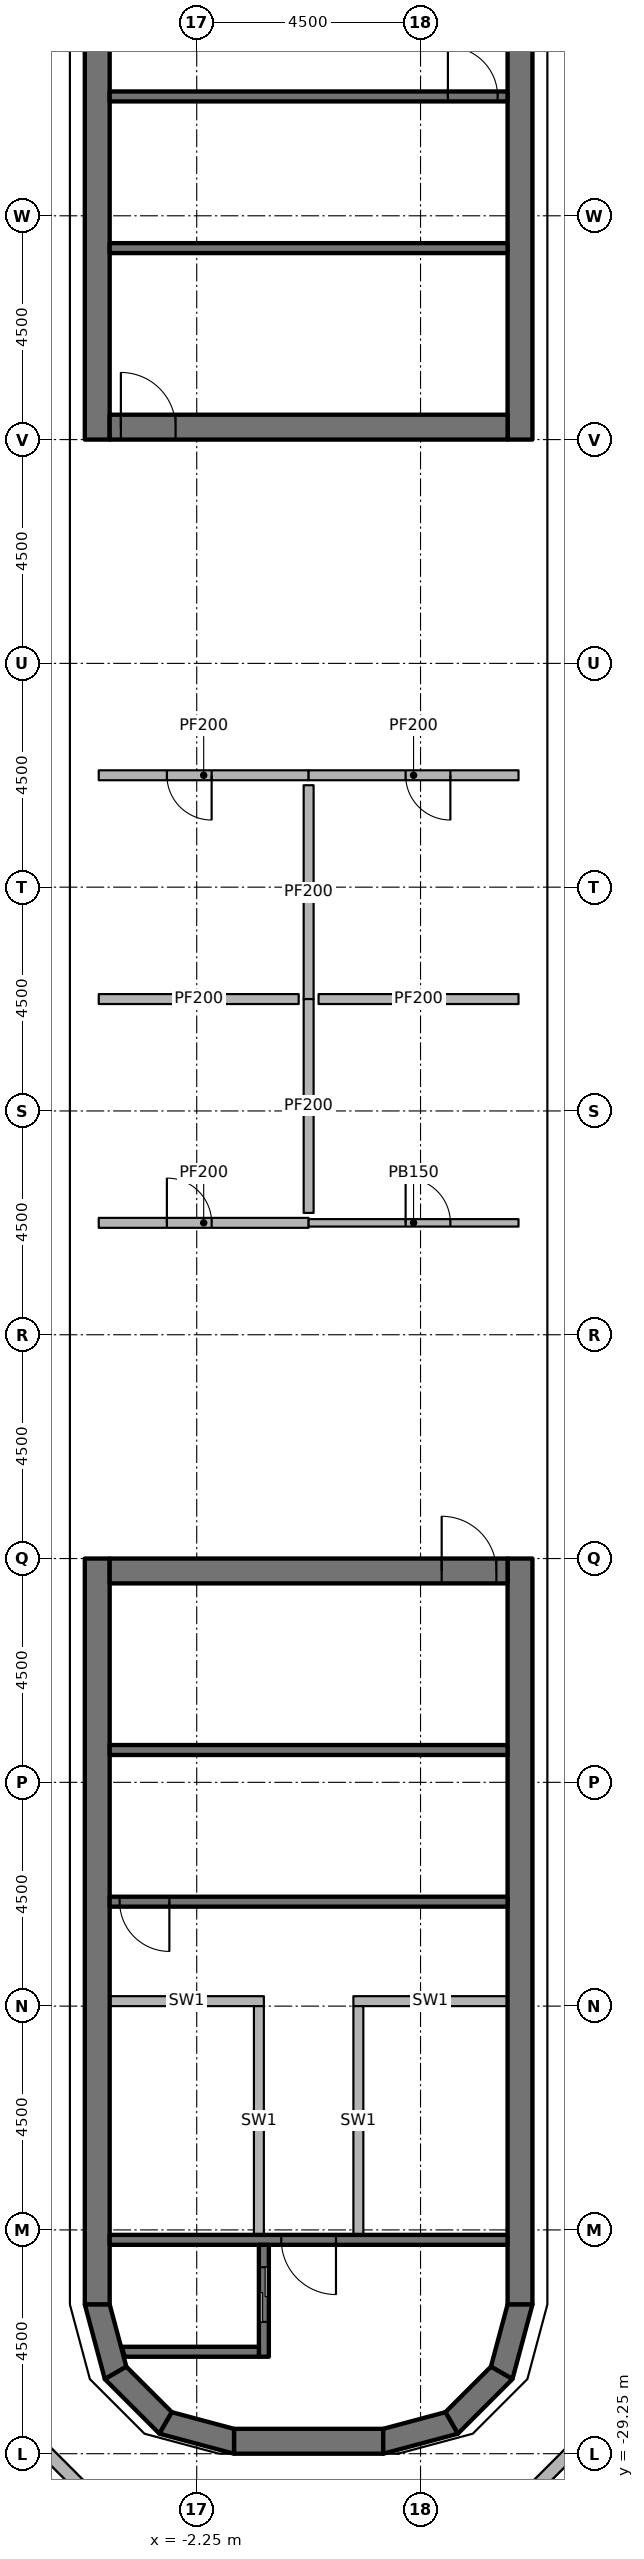
"""IFC4 building model, lengths in metres.
Left out: names, types, materials, properties, quantities, classifications, styles, units other than length and angle.
Written with IfcOpenShell. Run it as: python <this file> out.ifc"""

import sys

from ifc_helpers import new_model, si_unit, direction, frame, frame_2d, origin, origin_2d, place, context, subcontext, project, spatial, polyline, rectangle, outline, extrude, element, fill, save


model = new_model("IFC4")
c1 = context("Model", 3, precision=1e-05, world=origin(), true_north=direction((0.0, 1.0)))
c2 = subcontext(c1, "Body", "Model", "MODEL_VIEW")
j1 = project(units=[si_unit("LENGTHUNIT", "METRE"), si_unit("PLANEANGLEUNIT", "RADIAN")], contexts=[c1])
p1 = place(None, origin())
s1 = spatial("IfcSite", under=j1, at=p1, CompositionType="ELEMENT")
p2 = place(p1, origin())
s2 = spatial("IfcBuilding", under=s1, at=p2, CompositionType="ELEMENT")
p3 = place(p2, frame((0.0, 0.0, 316.8)))
s3 = spatial("IfcBuildingStorey", under=s2, at=p3, CompositionType="ELEMENT", Elevation=316.8)
for number, where, z_axis, x_axis in (
    (1, (-4.25, 11.25, 0.0), (0.0, 0.0, 1.0), (0.0, 1.0, 0.0)),
    (2, (4.25, 11.25, 0.0), (0.0, 0.0, 1.0), (0.0, 1.0, 0.0)),
):
    element("IfcWall", number, at=place(p3, frame(where, z_axis=z_axis, x_axis=x_axis)), inside=s3, PredefinedType="SHEAR", context=c2, shape_type="SweptSolid", body=[
        extrude(rectangle(XDim=15.0, YDim=0.5, at=frame_2d((7.5, 0.0))), origin(), (0.0, 0.0, 1.0), 3.35),
    ])
p4 = place(p3, frame((-4.0, 11.5, 0.0), z_axis=(0.0, 0.0, 1.0), x_axis=(1.0, 0.0, 0.0)))
e3 = element("IfcWall", 3, at=p4, inside=s3, PredefinedType="SHEAR", context=c2, shape_type="SweptSolid", body=[
    extrude(rectangle(XDim=8.0, YDim=0.5, at=frame_2d((4.0, 0.0))), origin(), (0.0, 0.0, 1.0), 3.35),
])
p5 = place(p4, frame((0.225, 0.0, 0.0)))
e4 = element("IfcOpeningElement", 4, at=p5, cuts=e3, PredefinedType="OPENING", context=c2, shape_type="SweptSolid", body=[
    extrude(rectangle(XDim=1.1, YDim=2.1, at=frame_2d((0.55, 1.05))), frame((0.0, 0.26, 0.0), z_axis=(0.0, -1.0, 0.0), x_axis=(1.0, 0.0, 0.0)), (0.0, 0.0, 1.0), 0.52),
])
for number, where, z_axis, x_axis in (
    (5, (-4.25, -11.25, 0.0), (0.0, 0.0, 1.0), (0.0, -1.0, 0.0)),
    (6, (4.25, -11.25, 0.0), (0.0, 0.0, 1.0), (0.0, -1.0, 0.0)),
):
    element("IfcWall", number, at=place(p3, frame(where, z_axis=z_axis, x_axis=x_axis)), inside=s3, PredefinedType="SHEAR", context=c2, shape_type="SweptSolid", body=[
        extrude(rectangle(XDim=15.0, YDim=0.5, at=frame_2d((7.5, 0.0))), origin(), (0.0, 0.0, 1.0), 3.35),
    ])
p6 = place(p3, frame((-4.0, -11.5, 0.0), z_axis=(0.0, 0.0, 1.0), x_axis=(1.0, 0.0, 0.0)))
e7 = element("IfcWall", 7, at=p6, inside=s3, PredefinedType="SHEAR", context=c2, shape_type="SweptSolid", body=[
    extrude(rectangle(XDim=8.0, YDim=0.5, at=frame_2d((4.0, 0.0))), origin(), (0.0, 0.0, 1.0), 3.35),
])
p7 = place(p6, frame((6.675, 0.0, 0.0)))
e8 = element("IfcOpeningElement", 8, at=p7, cuts=e7, PredefinedType="OPENING", context=c2, shape_type="SweptSolid", body=[
    extrude(rectangle(XDim=1.1, YDim=2.1, at=frame_2d((0.55, 1.05))), frame((0.0, 0.26, 0.0), z_axis=(0.0, -1.0, 0.0), x_axis=(1.0, 0.0, 0.0)), (0.0, 0.0, 1.0), 0.52),
])
p8 = place(p3, frame((-1.5, -29.0, 0.0), z_axis=(0.0, 0.0, 1.0), x_axis=(1.0, 0.0, 0.0)))
e9 = element("IfcWall", 9, at=p8, inside=s3, PredefinedType="SHEAR", context=c2, shape_type="SweptSolid", body=[
    extrude(rectangle(XDim=3.0, YDim=0.5, at=frame_2d((1.5, 0.0))), origin(), (0.0, 0.0, 1.0), 3.35),
])
p9 = place(p3, origin())
e10 = element("IfcWall", 10, at=p9, inside=s3, PredefinedType="SHEAR", context=c2, shape_type="SweptSolid", body=[
    extrude(outline(polyline([(-4.5, -26.25), (-4.098, -27.75), (-3.665, -27.5), (-4.0, -26.25), (-4.5, -26.25)])), origin(), (0.0, 0.0, 1.0), 3.35),
])
p10 = place(p3, origin())
e11 = element("IfcWall", 11, at=p10, inside=s3, PredefinedType="SHEAR", context=c2, shape_type="SweptSolid", body=[
    extrude(outline(polyline([(-4.098, -27.75), (-3.0, -28.848), (-2.75, -28.415), (-3.665, -27.5), (-4.098, -27.75)])), origin(), (0.0, 0.0, 1.0), 3.35),
])
p11 = place(p3, origin())
e12 = element("IfcWall", 12, at=p11, inside=s3, PredefinedType="SHEAR", context=c2, shape_type="SweptSolid", body=[
    extrude(outline(polyline([(-3.0, -28.848), (-1.5, -29.25), (-1.5, -28.75), (-2.75, -28.415), (-3.0, -28.848)])), origin(), (0.0, 0.0, 1.0), 3.35),
])
p12 = place(p3, origin())
e13 = element("IfcWall", 13, at=p12, inside=s3, PredefinedType="SHEAR", context=c2, shape_type="SweptSolid", body=[
    extrude(outline(polyline([(4.5, -26.25), (4.098, -27.75), (3.665, -27.5), (4.0, -26.25), (4.5, -26.25)])), origin(), (0.0, 0.0, 1.0), 3.35),
])
p13 = place(p3, origin())
e14 = element("IfcWall", 14, at=p13, inside=s3, PredefinedType="SHEAR", context=c2, shape_type="SweptSolid", body=[
    extrude(outline(polyline([(4.098, -27.75), (3.0, -28.848), (2.75, -28.415), (3.665, -27.5), (4.098, -27.75)])), origin(), (0.0, 0.0, 1.0), 3.35),
])
p14 = place(p3, origin())
e15 = element("IfcWall", 15, at=p14, inside=s3, PredefinedType="SHEAR", context=c2, shape_type="SweptSolid", body=[
    extrude(outline(polyline([(3.0, -28.848), (1.5, -29.25), (1.5, -28.75), (2.75, -28.415), (3.0, -28.848)])), origin(), (0.0, 0.0, 1.0), 3.35),
])
p15 = place(p3, origin())
e16 = element("IfcWall", 16, at=p15, inside=s3, PredefinedType="PARAPET", context=c2, shape_type="SweptSolid", body=[
    extrude(outline(polyline([(-4.221, -30.444), (-5.994, -28.671), (-5.77, -28.542), (-4.092, -30.22), (-4.221, -30.444)])), origin(), (0.0, 0.0, 1.0), 1.22),
])
p16 = place(p3, origin())
e17 = element("IfcWall", 17, at=p16, inside=s3, PredefinedType="PARAPET", context=c2, shape_type="SweptSolid", body=[
    extrude(outline(polyline([(5.994, -28.671), (4.221, -30.444), (4.092, -30.22), (5.77, -28.542), (5.994, -28.671)])), origin(), (0.0, 0.0, 1.0), 1.22),
])
p17 = place(p3, frame((0.0, 0.0, 3.6)))
e18 = element("IfcWall", 18, at=p17, inside=s3, PredefinedType="PARAPET", context=c2, shape_type="SweptSolid", body=[
    extrude(outline(polyline([(-4.221, -30.444), (-5.994, -28.671), (-5.77, -28.542), (-4.092, -30.22), (-4.221, -30.444)])), origin(), (0.0, 0.0, 1.0), 1.22),
])
p18 = place(p3, frame((0.0, 0.0, 3.6)))
e19 = element("IfcWall", 19, at=p18, inside=s3, PredefinedType="PARAPET", context=c2, shape_type="SweptSolid", body=[
    extrude(outline(polyline([(5.994, -28.671), (4.221, -30.444), (4.092, -30.22), (5.77, -28.542), (5.994, -28.671)])), origin(), (0.0, 0.0, 1.0), 1.22),
])
p19 = place(p3, frame((-4.0, 18.15, 0.0), z_axis=(0.0, 0.0, 1.0), x_axis=(1.0, 0.0, 0.0)))
e20 = element("IfcWall", 20, at=p19, inside=s3, PredefinedType="SHEAR", context=c2, shape_type="SweptSolid", body=[
    extrude(rectangle(XDim=8.0, YDim=0.2, at=frame_2d((4.0, 0.0))), origin(), (0.0, 0.0, 1.0), 3.35),
])
p20 = place(p19, frame((6.8, 0.0, 0.0)))
e21 = element("IfcOpeningElement", 21, at=p20, cuts=e20, PredefinedType="OPENING", context=c2, shape_type="SweptSolid", body=[
    extrude(rectangle(XDim=1.0, YDim=2.1, at=frame_2d((0.5, 1.05))), frame((0.0, 0.11, 0.0), z_axis=(0.0, -1.0, 0.0), x_axis=(1.0, 0.0, 0.0)), (0.0, 0.0, 1.0), 0.22),
])
p21 = place(p3, frame((-4.0, 15.1, 0.0), z_axis=(0.0, 0.0, 1.0), x_axis=(1.0, 0.0, 0.0)))
e22 = element("IfcWall", 22, at=p21, inside=s3, PredefinedType="SHEAR", context=c2, shape_type="SweptSolid", body=[
    extrude(rectangle(XDim=8.0, YDim=0.2, at=frame_2d((4.0, 0.0))), origin(), (0.0, 0.0, 1.0), 3.35),
])
p22 = place(p3, frame((4.0, -24.95, 0.0), z_axis=(0.0, 0.0, 1.0), x_axis=(-1.0, 0.0, 0.0)))
e23 = element("IfcWall", 23, at=p22, inside=s3, PredefinedType="SHEAR", context=c2, shape_type="SweptSolid", body=[
    extrude(rectangle(XDim=8.0, YDim=0.2, at=frame_2d((4.0, 0.0))), origin(), (0.0, 0.0, 1.0), 3.35),
])
p23 = place(p22, frame((3.45, 0.0, 0.0)))
e24 = element("IfcOpeningElement", 24, at=p23, cuts=e23, PredefinedType="OPENING", context=c2, shape_type="SweptSolid", body=[
    extrude(rectangle(XDim=1.1, YDim=2.1, at=frame_2d((0.55, 1.05))), frame((0.0, 0.11, 0.0), z_axis=(0.0, -1.0, 0.0), x_axis=(1.0, 0.0, 0.0)), (0.0, 0.0, 1.0), 0.22),
])
p24 = place(p3, frame((-0.9, -27.3, 0.0), z_axis=(0.0, 0.0, 1.0), x_axis=(0.0, 1.0, 0.0)))
e25 = element("IfcWall", 25, at=p24, inside=s3, PredefinedType="SHEAR", context=c2, shape_type="SweptSolid", body=[
    extrude(rectangle(XDim=2.25, YDim=0.2, at=frame_2d((1.125, 0.0))), origin(), (0.0, 0.0, 1.0), 3.35),
])
p25 = place(p24, frame((0.7, 0.0, 0.0)))
e26 = element("IfcOpeningElement", 26, at=p25, cuts=e25, PredefinedType="OPENING", context=c2, shape_type="SweptSolid", body=[
    extrude(rectangle(XDim=1.1, YDim=2.3, at=frame_2d((0.55, 1.15))), frame((0.0, 0.11, 0.0), z_axis=(0.0, -1.0, 0.0), x_axis=(1.0, 0.0, 0.0)), (0.0, 0.0, 1.0), 0.22),
])
p26 = place(p3, origin())
e27 = element("IfcWall", 27, at=p26, inside=s3, PredefinedType="SHEAR", context=c2, shape_type="SweptSolid", body=[
    extrude(outline(polyline([(-1.0, -27.1), (-3.755, -27.1), (-3.701, -27.3), (-1.0, -27.3), (-1.0, -27.1)])), origin(), (0.0, 0.0, 1.0), 3.35),
])
p27 = place(p3, frame((4.0, -18.15, 0.0), z_axis=(0.0, 0.0, 1.0), x_axis=(-1.0, 0.0, 0.0)))
e28 = element("IfcWall", 28, at=p27, inside=s3, PredefinedType="SHEAR", context=c2, shape_type="SweptSolid", body=[
    extrude(rectangle(XDim=8.0, YDim=0.2, at=frame_2d((4.0, 0.0))), origin(), (0.0, 0.0, 1.0), 3.35),
])
p28 = place(p27, frame((6.8, 0.0, 0.0)))
e29 = element("IfcOpeningElement", 29, at=p28, cuts=e28, PredefinedType="OPENING", context=c2, shape_type="SweptSolid", body=[
    extrude(rectangle(XDim=1.0, YDim=2.1, at=frame_2d((0.5, 1.05))), frame((0.0, 0.11, 0.0), z_axis=(0.0, -1.0, 0.0), x_axis=(1.0, 0.0, 0.0)), (0.0, 0.0, 1.0), 0.22),
])
p29 = place(p3, frame((4.0, -15.1, 0.0), z_axis=(0.0, 0.0, 1.0), x_axis=(-1.0, 0.0, 0.0)))
e30 = element("IfcWall", 30, at=p29, inside=s3, PredefinedType="SHEAR", context=c2, shape_type="SweptSolid", body=[
    extrude(rectangle(XDim=8.0, YDim=0.2, at=frame_2d((4.0, 0.0))), origin(), (0.0, 0.0, 1.0), 3.35),
])
p30 = place(p3, frame((4.0, -20.15, 0.0), z_axis=(0.0, 0.0, 1.0), x_axis=(-1.0, 0.0, 0.0)))
e31 = element("IfcWall", 31, at=p30, inside=s3, PredefinedType="PARTITIONING", context=c2, shape_type="SweptSolid", body=[
    extrude(rectangle(XDim=3.1, YDim=0.2, at=frame_2d((1.55, 0.0))), origin(), (0.0, 0.0, 1.0), 3.35),
])
p31 = place(p3, frame((1.0, -24.85, 0.0), z_axis=(0.0, 0.0, 1.0), x_axis=(0.0, 1.0, 0.0)))
e32 = element("IfcWall", 32, at=p31, inside=s3, PredefinedType="PARTITIONING", context=c2, shape_type="SweptSolid", body=[
    extrude(rectangle(XDim=4.6, YDim=0.2, at=frame_2d((2.3, 0.0))), origin(), (0.0, 0.0, 1.0), 3.35),
])
p32 = place(p3, frame((-0.9, -20.15, 0.0), z_axis=(0.0, 0.0, 1.0), x_axis=(-1.0, 0.0, 0.0)))
e33 = element("IfcWall", 33, at=p32, inside=s3, PredefinedType="PARTITIONING", context=c2, shape_type="SweptSolid", body=[
    extrude(rectangle(XDim=3.1, YDim=0.2, at=frame_2d((1.55, 0.0))), origin(), (0.0, 0.0, 1.0), 3.35),
])
p33 = place(p3, frame((-1.0, -24.85, 0.0), z_axis=(0.0, 0.0, 1.0), x_axis=(0.0, 1.0, 0.0)))
e34 = element("IfcWall", 34, at=p33, inside=s3, PredefinedType="PARTITIONING", context=c2, shape_type="SweptSolid", body=[
    extrude(rectangle(XDim=4.6, YDim=0.2, at=frame_2d((2.3, 0.0))), origin(), (0.0, 0.0, 1.0), 3.35),
])
p34 = place(p3, frame((0.0, 4.5, 0.0), z_axis=(0.0, 0.0, 1.0), x_axis=(-1.0, 0.0, 0.0)))
e35 = element("IfcWall", 35, at=p34, inside=s3, PredefinedType="PARTITIONING", context=c2, shape_type="SweptSolid", body=[
    extrude(rectangle(XDim=4.22, YDim=0.2, at=frame_2d((2.11, 0.0))), origin(), (0.0, 0.0, 1.0), 2.411),
])
p35 = place(p34, frame((1.95, 0.0, 0.0)))
e36 = element("IfcOpeningElement", 36, at=p35, cuts=e35, PredefinedType="OPENING", context=c2, shape_type="SweptSolid", body=[
    extrude(rectangle(XDim=0.9, YDim=2.1, at=frame_2d((0.45, 1.05))), frame((0.0, 0.11, 0.0), z_axis=(0.0, -1.0, 0.0), x_axis=(1.0, 0.0, 0.0)), (0.0, 0.0, 1.0), 0.22),
])
p36 = place(p3, frame((4.22, 4.5, 0.0), z_axis=(0.0, 0.0, 1.0), x_axis=(-1.0, 0.0, 0.0)))
e37 = element("IfcWall", 37, at=p36, inside=s3, PredefinedType="PARTITIONING", context=c2, shape_type="SweptSolid", body=[
    extrude(rectangle(XDim=4.22, YDim=0.2, at=frame_2d((2.11, 0.0))), origin(), (0.0, 0.0, 1.0), 2.411),
])
p37 = place(p36, frame((1.37, 0.0, 0.0)))
e38 = element("IfcOpeningElement", 38, at=p37, cuts=e37, PredefinedType="OPENING", context=c2, shape_type="SweptSolid", body=[
    extrude(rectangle(XDim=0.9, YDim=2.1, at=frame_2d((0.45, 1.05))), frame((0.0, 0.11, 0.0), z_axis=(0.0, -1.0, 0.0), x_axis=(1.0, 0.0, 0.0)), (0.0, 0.0, 1.0), 0.22),
])
p38 = place(p3, frame((-4.22, -4.5, 0.0), z_axis=(0.0, 0.0, 1.0), x_axis=(1.0, 0.0, 0.0)))
e39 = element("IfcWall", 39, at=p38, inside=s3, PredefinedType="PARTITIONING", context=c2, shape_type="SweptSolid", body=[
    extrude(rectangle(XDim=4.22, YDim=0.2, at=frame_2d((2.11, 0.0))), origin(), (0.0, 0.0, 1.0), 2.411),
])
p39 = place(p38, frame((1.37, 0.0, 0.0)))
e40 = element("IfcOpeningElement", 40, at=p39, cuts=e39, PredefinedType="OPENING", context=c2, shape_type="SweptSolid", body=[
    extrude(rectangle(XDim=0.9, YDim=2.1, at=frame_2d((0.45, 1.05))), frame((0.0, 0.11, 0.0), z_axis=(0.0, -1.0, 0.0), x_axis=(1.0, 0.0, 0.0)), (0.0, 0.0, 1.0), 0.22),
])
p40 = place(p3, frame((0.0, -4.5, 0.0), z_axis=(0.0, 0.0, 1.0), x_axis=(1.0, 0.0, 0.0)))
e41 = element("IfcWall", 41, at=p40, inside=s3, PredefinedType="PARTITIONING", context=c2, shape_type="SweptSolid", body=[
    extrude(rectangle(XDim=4.22, YDim=0.15, at=frame_2d((2.11, 0.0))), origin(), (0.0, 0.0, 1.0), 2.411),
])
p41 = place(p40, frame((1.95, 0.0, 0.0)))
e42 = element("IfcOpeningElement", 42, at=p41, cuts=e41, PredefinedType="OPENING", context=c2, shape_type="SweptSolid", body=[
    extrude(rectangle(XDim=0.9, YDim=2.1, at=frame_2d((0.45, 1.05))), frame((0.0, 0.085, 0.0), z_axis=(0.0, -1.0, 0.0), x_axis=(1.0, 0.0, 0.0)), (0.0, 0.0, 1.0), 0.17),
])
p42 = place(p3, frame((0.0, 4.3, 0.0), z_axis=(0.0, 0.0, 1.0), x_axis=(0.0, -1.0, 0.0)))
e43 = element("IfcWall", 43, at=p42, inside=s3, PredefinedType="PARTITIONING", context=c2, shape_type="SweptSolid", body=[
    extrude(rectangle(XDim=4.3, YDim=0.2, at=frame_2d((2.15, 0.0))), origin(), (0.0, 0.0, 1.0), 2.728),
])
for number, where, z_axis, x_axis in (
    (44, (-0.2, 0.0, 0.0), (0.0, 0.0, 1.0), (-1.0, 0.0, 0.0)),
    (45, (4.22, 0.0, 0.0), (0.0, 0.0, 1.0), (-1.0, 0.0, 0.0)),
):
    element("IfcWall", number, at=place(p3, frame(where, z_axis=z_axis, x_axis=x_axis)), inside=s3, PredefinedType="PARTITIONING", context=c2, shape_type="SweptSolid", body=[
        extrude(rectangle(XDim=4.02, YDim=0.2, at=frame_2d((2.01, 0.0))), origin(), (0.0, 0.0, 1.0), 2.411),
    ])
p43 = place(p3, frame((0.0, 0.0, 0.0), z_axis=(0.0, 0.0, 1.0), x_axis=(0.0, -1.0, 0.0)))
e46 = element("IfcWall", 46, at=p43, inside=s3, PredefinedType="PARTITIONING", context=c2, shape_type="SweptSolid", body=[
    extrude(rectangle(XDim=4.3, YDim=0.2, at=frame_2d((2.15, 0.0))), origin(), (0.0, 0.0, 1.0), 2.728),
])
p44 = place(p2, frame((0.0, 0.0, 320.4)))
p45 = place(p44, frame((0.0, 0.0, -0.25)))
p46 = place(p45, origin())
p47 = place(p46, frame((0.0, 0.0, 0.2)))
e47 = element("IfcWindow", 47, at=p47, inside=s3, PartitioningType="SINGLE_PANEL", PredefinedType="SKYLIGHT", context=c2, shape_type="SweptSolid", body=[
    extrude(rectangle(XDim=1.0, YDim=1.0, at=origin_2d()), origin(), (0.0, 0.0, 1.0), 0.05),
])
p48 = place(p20, origin())
e48 = element("IfcDoor", 48, at=p48, inside=s3, OperationType="SINGLE_SWING_LEFT", PredefinedType="DOOR", context=c2, shape_type="SweptSolid", body=[
    extrude(rectangle(XDim=1.0, YDim=2.1, at=frame_2d((0.5, 1.05))), frame((0.0, 0.025, 0.0), z_axis=(0.0, -1.0, 0.0), x_axis=(1.0, 0.0, 0.0)), (0.0, 0.0, 1.0), 0.05),
])
fill(e21, e48)
p49 = place(p5, origin())
e49 = element("IfcDoor", 49, at=p49, inside=s3, OperationType="SINGLE_SWING_LEFT", PredefinedType="DOOR", context=c2, shape_type="SweptSolid", body=[
    extrude(rectangle(XDim=1.1, YDim=2.1, at=frame_2d((0.55, 1.05))), frame((0.0, 0.025, 0.0), z_axis=(0.0, -1.0, 0.0), x_axis=(1.0, 0.0, 0.0)), (0.0, 0.0, 1.0), 0.05),
])
fill(e4, e49)
p50 = place(p23, origin())
e50 = element("IfcDoor", 50, at=p50, inside=s3, OperationType="SINGLE_SWING_RIGHT", PredefinedType="DOOR", context=c2, shape_type="SweptSolid", body=[
    extrude(rectangle(XDim=1.1, YDim=2.1, at=frame_2d((0.55, 1.05))), frame((0.0, 0.025, 0.0), z_axis=(0.0, -1.0, 0.0), x_axis=(1.0, 0.0, 0.0)), (0.0, 0.0, 1.0), 0.05),
])
fill(e24, e50)
p51 = place(p28, origin())
e51 = element("IfcDoor", 51, at=p51, inside=s3, OperationType="SINGLE_SWING_LEFT", PredefinedType="DOOR", context=c2, shape_type="SweptSolid", body=[
    extrude(rectangle(XDim=1.0, YDim=2.1, at=frame_2d((0.5, 1.05))), frame((0.0, 0.025, 0.0), z_axis=(0.0, -1.0, 0.0), x_axis=(1.0, 0.0, 0.0)), (0.0, 0.0, 1.0), 0.05),
])
fill(e29, e51)
p52 = place(p7, origin())
e52 = element("IfcDoor", 52, at=p52, inside=s3, OperationType="SINGLE_SWING_LEFT", PredefinedType="DOOR", context=c2, shape_type="SweptSolid", body=[
    extrude(rectangle(XDim=1.1, YDim=2.1, at=frame_2d((0.55, 1.05))), frame((0.0, 0.025, 0.0), z_axis=(0.0, -1.0, 0.0), x_axis=(1.0, 0.0, 0.0)), (0.0, 0.0, 1.0), 0.05),
])
fill(e8, e52)
p53 = place(p25, origin())
e53 = element("IfcDoor", 53, at=p53, inside=s3, OperationType="DOUBLE_DOOR_SLIDING", PredefinedType="DOOR", context=c2, shape_type="SweptSolid", body=[
    extrude(rectangle(XDim=1.1, YDim=2.3, at=frame_2d((0.55, 1.15))), frame((0.0, 0.025, 0.0), z_axis=(0.0, -1.0, 0.0), x_axis=(1.0, 0.0, 0.0)), (0.0, 0.0, 1.0), 0.05),
])
fill(e26, e53)
p54 = place(p35, origin())
e54 = element("IfcDoor", 54, at=p54, inside=s3, OperationType="SINGLE_SWING_LEFT", PredefinedType="DOOR", context=c2, shape_type="SweptSolid", body=[
    extrude(rectangle(XDim=0.9, YDim=2.1, at=frame_2d((0.45, 1.05))), frame((0.0, 0.025, 0.0), z_axis=(0.0, -1.0, 0.0), x_axis=(1.0, 0.0, 0.0)), (0.0, 0.0, 1.0), 0.05),
])
fill(e36, e54)
p55 = place(p37, origin())
e55 = element("IfcDoor", 55, at=p55, inside=s3, OperationType="SINGLE_SWING_LEFT", PredefinedType="DOOR", context=c2, shape_type="SweptSolid", body=[
    extrude(rectangle(XDim=0.9, YDim=2.1, at=frame_2d((0.45, 1.05))), frame((0.0, 0.025, 0.0), z_axis=(0.0, -1.0, 0.0), x_axis=(1.0, 0.0, 0.0)), (0.0, 0.0, 1.0), 0.05),
])
fill(e38, e55)
p56 = place(p39, origin())
e56 = element("IfcDoor", 56, at=p56, inside=s3, OperationType="SINGLE_SWING_LEFT", PredefinedType="DOOR", context=c2, shape_type="SweptSolid", body=[
    extrude(rectangle(XDim=0.9, YDim=2.1, at=frame_2d((0.45, 1.05))), frame((0.0, 0.025, 0.0), z_axis=(0.0, -1.0, 0.0), x_axis=(1.0, 0.0, 0.0)), (0.0, 0.0, 1.0), 0.05),
])
fill(e40, e56)
p57 = place(p41, origin())
e57 = element("IfcDoor", 57, at=p57, inside=s3, OperationType="SINGLE_SWING_LEFT", PredefinedType="DOOR", context=c2, shape_type="SweptSolid", body=[
    extrude(rectangle(XDim=0.9, YDim=2.1, at=frame_2d((0.45, 1.05))), frame((0.0, 0.025, 0.0), z_axis=(0.0, -1.0, 0.0), x_axis=(1.0, 0.0, 0.0)), (0.0, 0.0, 1.0), 0.05),
])
fill(e42, e57)
save(model, sys.argv[1])
